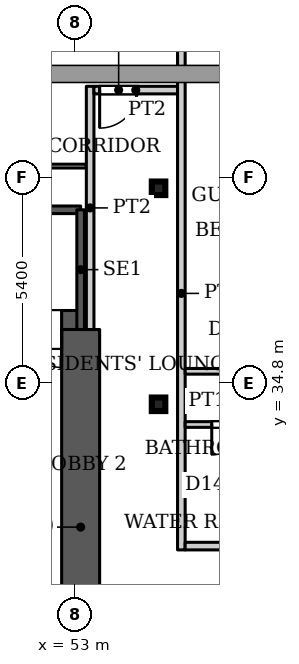
"""IFC4 building model, lengths in metres.
Left out: names, types, materials, properties, quantities, classifications, styles, units other than length and angle.
Written with IfcOpenShell. Run it as: python <this file> out.ifc"""

import sys

from ifc_helpers import new_model, si_unit, direction, frame, frame_2d, origin, origin_2d, place, context, subcontext, project, spatial, rectangle, hollow_rectangle, extrude, source, transform, mapped, element, fill, save


model = new_model("IFC4")
c1 = context("Model", 3, precision=1e-05, world=origin(), true_north=direction((0.0, 1.0)))
c2 = subcontext(c1, "Body", "Model", "MODEL_VIEW")
j1 = project(units=[si_unit("LENGTHUNIT", "METRE"), si_unit("PLANEANGLEUNIT", "RADIAN")], contexts=[c1])
p1 = place(None, origin())
s1 = spatial("IfcSite", under=j1, at=p1, CompositionType="ELEMENT")
p2 = place(p1, origin())
s2 = spatial("IfcBuilding", under=s1, at=p2, CompositionType="ELEMENT")
p3 = place(p2, frame((0.0, 0.0, 69.5)))
s3 = spatial("IfcBuildingStorey", under=s2, at=p3, CompositionType="ELEMENT", Elevation=69.5)
for number, where, z_axis, x_axis in (
    (1, (55.2, 34.232, 0.0), (0.0, 0.0, 1.0), (1.0, 0.0, 0.0)),
    (2, (55.2, 39.916, 0.0), (0.0, 0.0, 1.0), (1.0, 0.0, 0.0)),
):
    element("IfcColumn", number, at=place(p3, frame(where, z_axis=z_axis, x_axis=x_axis)), inside=s3, PredefinedType="COLUMN", context=c2, shape_type="SweptSolid", body=[
        extrude(hollow_rectangle(XDim=0.356, YDim=0.356, WallThickness=0.016, InnerFilletRadius=0.016, OuterFilletRadius=0.032, at=origin_2d()), origin(), (0.0, 0.0, 1.0), 3.9),
    ])
p4 = place(p3, frame((34.75, 36.2, 0.0), z_axis=(0.0, 0.0, 1.0), x_axis=(1.0, 0.0, 0.0)))
e3 = element("IfcWall", 3, at=p4, inside=s3, PredefinedType="SHEAR", context=c2, shape_type="SweptSolid", body=[
    extrude(rectangle(XDim=18.4, YDim=1.0, at=frame_2d((9.2, 0.0))), origin(), (0.0, 0.0, 1.0), 3.9),
])
p5 = place(p4, frame((16.9, 0.0, 0.0)))
e4 = element("IfcOpeningElement", 4, at=p5, cuts=e3, PredefinedType="OPENING", context=c2, shape_type="SweptSolid", body=[
    extrude(rectangle(XDim=1.0, YDim=2.2, at=frame_2d((0.5, 1.1))), frame((0.0, 0.51, 0.0), z_axis=(0.0, -1.0, 0.0), x_axis=(1.0, 0.0, 0.0)), (0.0, 0.0, 1.0), 1.02),
])
p6 = place(p3, frame((53.15, 25.8, 0.0), z_axis=(0.0, 0.0, 1.0), x_axis=(0.0, 1.0, 0.0)))
e5 = element("IfcWall", 5, at=p6, inside=s3, PredefinedType="SHEAR", context=c2, shape_type="SweptSolid", body=[
    extrude(rectangle(XDim=10.4, YDim=1.0, at=frame_2d((5.2, 0.0))), origin(), (0.0, 0.0, 1.0), 3.9),
])
p7 = place(p6, frame((1.175, 0.0, 0.0)))
e6 = element("IfcOpeningElement", 6, at=p7, cuts=e5, PredefinedType="OPENING", context=c2, shape_type="SweptSolid", body=[
    extrude(rectangle(XDim=0.9, YDim=2.2, at=frame_2d((0.45, 1.1))), frame((0.0, 0.51, 0.0), z_axis=(0.0, -1.0, 0.0), x_axis=(1.0, 0.0, 0.0)), (0.0, 0.0, 1.0), 1.02),
])
p8 = place(p3, frame((43.99, 39.35, 0.0), z_axis=(0.0, 0.0, 1.0), x_axis=(1.0, 0.0, 0.0)))
e7 = element("IfcWall", 7, at=p8, inside=s3, PredefinedType="SHEAR", context=c2, shape_type="SweptSolid", body=[
    extrude(rectangle(XDim=9.16, YDim=0.2, at=frame_2d((4.58, 0.0))), origin(), (0.0, 0.0, 1.0), 3.9),
])
p9 = place(p3, frame((53.15, 36.2, 0.0), z_axis=(0.0, 0.0, 1.0), x_axis=(0.0, 1.0, 0.0)))
e8 = element("IfcWall", 8, at=p9, inside=s3, PredefinedType="SHEAR", context=c2, shape_type="SweptSolid", body=[
    extrude(rectangle(XDim=3.15, YDim=0.2, at=frame_2d((1.575, 0.0))), origin(), (0.0, 0.0, 1.0), 3.9),
])
p10 = place(p3, frame((38.499, 40.5, 0.0), z_axis=(0.0, 0.0, 1.0), x_axis=(1.0, 0.0, 0.0)))
e9 = element("IfcWall", 9, at=p10, inside=s3, PredefinedType="PARTITIONING", context=c2, shape_type="SweptSolid", body=[
    extrude(rectangle(XDim=14.801, YDim=0.1, at=frame_2d((7.4, 0.0))), origin(), (0.0, 0.0, 1.0), 3.6),
])
p11 = place(p10, frame((6.701, 0.0, 0.0)))
e10 = element("IfcOpeningElement", 10, at=p11, cuts=e9, PredefinedType="OPENING", context=c2, shape_type="SweptSolid", body=[
    extrude(rectangle(XDim=1.0, YDim=2.1, at=frame_2d((0.5, 1.05))), frame((0.0, 0.06, 0.0), z_axis=(0.0, -1.0, 0.0), x_axis=(1.0, 0.0, 0.0)), (0.0, 0.0, 1.0), 0.12),
])
p12 = place(p3, frame((53.4, 36.199, 0.0), z_axis=(0.0, 0.0, 1.0), x_axis=(0.0, 1.0, 0.0)))
e11 = element("IfcWall", 11, at=p12, inside=s3, PredefinedType="PARTITIONING", context=c2, shape_type="SweptSolid", body=[
    extrude(rectangle(XDim=6.401, YDim=0.2, at=frame_2d((3.201, 0.0))), origin(), (0.0, 0.0, 1.0), 3.6),
])
p13 = place(p3, frame((53.5, 42.5, 0.0), z_axis=(0.0, 0.0, 1.0), x_axis=(1.0, 0.0, 0.0)))
e12 = element("IfcWall", 12, at=p13, inside=s3, PredefinedType="PARTITIONING", context=c2, shape_type="SweptSolid", body=[
    extrude(rectangle(XDim=2.2, YDim=0.2, at=frame_2d((1.1, 0.0))), origin(), (0.0, 0.0, 1.0), 3.6),
])
p14 = place(p13, frame((0.15, 0.0, 0.0)))
e13 = element("IfcOpeningElement", 13, at=p14, cuts=e12, PredefinedType="OPENING", context=c2, shape_type="SweptSolid", body=[
    extrude(rectangle(XDim=1.0, YDim=2.1, at=frame_2d((0.5, 1.05))), frame((0.0, 0.11, 0.0), z_axis=(0.0, -1.0, 0.0), x_axis=(1.0, 0.0, 0.0)), (0.0, 0.0, 1.0), 0.22),
])
p15 = place(p3, frame((55.8, 30.4, 0.0), z_axis=(0.0, 0.0, 1.0), x_axis=(0.0, 1.0, 0.0)))
e14 = element("IfcWall", 14, at=p15, inside=s3, PredefinedType="PARTITIONING", context=c2, shape_type="SweptSolid", body=[
    extrude(rectangle(XDim=13.5, YDim=0.2, at=frame_2d((6.75, 0.0))), origin(), (0.0, 0.0, 1.0), 3.6),
])
p16 = place(p3, frame((55.9, 30.5, 0.0), z_axis=(0.0, 0.0, 1.0), x_axis=(1.0, 0.0, 0.0)))
e15 = element("IfcWall", 15, at=p16, inside=s3, PredefinedType="PARTITIONING", context=c2, shape_type="SweptSolid", body=[
    extrude(rectangle(XDim=42.2, YDim=0.2, at=frame_2d((21.1, 0.0))), origin(), (0.0, 0.0, 1.0), 3.6),
])
p17 = place(p16, frame((14.7, 0.0, 0.0)))
e16 = element("IfcOpeningElement", 16, at=p17, cuts=e15, PredefinedType="OPENING", context=c2, shape_type="SweptSolid", body=[
    extrude(rectangle(XDim=1.0, YDim=2.1, at=frame_2d((0.5, 1.05))), frame((0.0, 0.11, 0.0), z_axis=(0.0, -1.0, 0.0), x_axis=(1.0, 0.0, 0.0)), (0.0, 0.0, 1.0), 0.22),
])
p18 = place(p16, frame((27.9, 0.0, 0.0)))
e17 = element("IfcOpeningElement", 17, at=p18, cuts=e15, PredefinedType="OPENING", context=c2, shape_type="SweptSolid", body=[
    extrude(rectangle(XDim=1.0, YDim=2.1, at=frame_2d((0.5, 1.05))), frame((0.0, 0.11, 0.0), z_axis=(0.0, -1.0, 0.0), x_axis=(1.0, 0.0, 0.0)), (0.0, 0.0, 1.0), 0.22),
])
p19 = place(p16, frame((39.0, 0.0, 0.0)))
e18 = element("IfcOpeningElement", 18, at=p19, cuts=e15, PredefinedType="OPENING", context=c2, shape_type="SweptSolid", body=[
    extrude(rectangle(XDim=1.0, YDim=2.1, at=frame_2d((0.5, 1.05))), frame((0.0, 0.11, 0.0), z_axis=(0.0, -1.0, 0.0), x_axis=(1.0, 0.0, 0.0)), (0.0, 0.0, 1.0), 0.22),
])
p20 = place(p3, frame((55.9, 33.7, 0.0), z_axis=(0.0, 0.0, 1.0), x_axis=(1.0, 0.0, 0.0)))
e19 = element("IfcWall", 19, at=p20, inside=s3, PredefinedType="PARTITIONING", context=c2, shape_type="SweptSolid", body=[
    extrude(rectangle(XDim=14.35, YDim=0.15, at=frame_2d((7.175, 0.0))), origin(), (0.0, 0.0, 1.0), 3.6),
])
p21 = place(p20, frame((0.7, 0.0, 0.0)))
e20 = element("IfcOpeningElement", 20, at=p21, cuts=e19, PredefinedType="OPENING", context=c2, shape_type="SweptSolid", body=[
    extrude(rectangle(XDim=0.8, YDim=2.1, at=frame_2d((0.4, 1.05))), frame((0.0, 0.085, 0.0), z_axis=(0.0, -1.0, 0.0), x_axis=(1.0, 0.0, 0.0)), (0.0, 0.0, 1.0), 0.17),
])
p22 = place(p20, frame((12.3, 0.0, 0.0)))
e21 = element("IfcOpeningElement", 21, at=p22, cuts=e19, PredefinedType="OPENING", context=c2, shape_type="SweptSolid", body=[
    extrude(rectangle(XDim=0.8, YDim=2.1, at=frame_2d((0.4, 1.05))), frame((0.0, 0.085, 0.0), z_axis=(0.0, -1.0, 0.0), x_axis=(1.0, 0.0, 0.0)), (0.0, 0.0, 1.0), 0.17),
])
p23 = place(p20, frame((3.35, 0.0, 0.0)))
e22 = element("IfcOpeningElement", 22, at=p23, cuts=e19, PredefinedType="OPENING", context=c2, shape_type="SweptSolid", body=[
    extrude(rectangle(XDim=0.9, YDim=2.1, at=frame_2d((0.45, 1.05))), frame((0.0, 0.085, 0.0), z_axis=(0.0, -1.0, 0.0), x_axis=(1.0, 0.0, 0.0)), (0.0, 0.0, 1.0), 0.17),
])
p24 = place(p20, frame((10.6, 0.0, 0.0)))
e23 = element("IfcOpeningElement", 23, at=p24, cuts=e19, PredefinedType="OPENING", context=c2, shape_type="SweptSolid", body=[
    extrude(rectangle(XDim=0.8, YDim=2.1, at=frame_2d((0.4, 1.05))), frame((0.0, 0.085, 0.0), z_axis=(0.0, -1.0, 0.0), x_axis=(1.0, 0.0, 0.0)), (0.0, 0.0, 1.0), 0.17),
])
p25 = place(p20, frame((7.3, 0.0, 0.0)))
e24 = element("IfcOpeningElement", 24, at=p25, cuts=e19, PredefinedType="OPENING", context=c2, shape_type="SweptSolid", body=[
    extrude(rectangle(XDim=0.8, YDim=2.1, at=frame_2d((0.4, 1.05))), frame((0.0, 0.085, 0.0), z_axis=(0.0, -1.0, 0.0), x_axis=(1.0, 0.0, 0.0)), (0.0, 0.0, 1.0), 0.17),
])
p26 = place(p20, frame((5.65, 0.0, 0.0)))
e25 = element("IfcOpeningElement", 25, at=p26, cuts=e19, PredefinedType="OPENING", context=c2, shape_type="SweptSolid", body=[
    extrude(rectangle(XDim=0.8, YDim=2.1, at=frame_2d((0.4, 1.05))), frame((0.0, 0.085, 0.0), z_axis=(0.0, -1.0, 0.0), x_axis=(1.0, 0.0, 0.0)), (0.0, 0.0, 1.0), 0.17),
])
p27 = place(p3, frame((55.9, 35.1, 0.0), z_axis=(0.0, 0.0, 1.0), x_axis=(1.0, 0.0, 0.0)))
e26 = element("IfcWall", 26, at=p27, inside=s3, PredefinedType="PARTITIONING", context=c2, shape_type="SweptSolid", body=[
    extrude(rectangle(XDim=18.4, YDim=0.15, at=frame_2d((9.2, 0.0))), origin(), (0.0, 0.0, 1.0), 3.6),
])
p28 = place(p27, frame((1.25, 0.0, 0.0)))
e27 = element("IfcOpeningElement", 27, at=p28, cuts=e26, PredefinedType="OPENING", context=c2, shape_type="SweptSolid", body=[
    extrude(rectangle(XDim=0.9, YDim=2.1, at=frame_2d((0.45, 1.05))), frame((0.0, 0.085, 0.0), z_axis=(0.0, -1.0, 0.0), x_axis=(1.0, 0.0, 0.0)), (0.0, 0.0, 1.0), 0.17),
])
p29 = place(p27, frame((9.2, 0.0, 0.0)))
e28 = element("IfcOpeningElement", 28, at=p29, cuts=e26, PredefinedType="OPENING", context=c2, shape_type="SweptSolid", body=[
    extrude(rectangle(XDim=0.9, YDim=2.1, at=frame_2d((0.45, 1.05))), frame((0.0, 0.085, 0.0), z_axis=(0.0, -1.0, 0.0), x_axis=(1.0, 0.0, 0.0)), (0.0, 0.0, 1.0), 0.17),
])
p30 = place(p27, frame((12.35, 0.0, 0.0)))
e29 = element("IfcOpeningElement", 29, at=p30, cuts=e26, PredefinedType="OPENING", context=c2, shape_type="SweptSolid", body=[
    extrude(rectangle(XDim=1.0, YDim=2.1, at=frame_2d((0.5, 1.05))), frame((0.0, 0.085, 0.0), z_axis=(0.0, -1.0, 0.0), x_axis=(1.0, 0.0, 0.0)), (0.0, 0.0, 1.0), 0.17),
])
p31 = place(p27, frame((15.9, 0.0, 0.0)))
e30 = element("IfcOpeningElement", 30, at=p31, cuts=e26, PredefinedType="OPENING", context=c2, shape_type="SweptSolid", body=[
    extrude(rectangle(XDim=1.6, YDim=2.1, at=frame_2d((0.8, 1.05))), frame((0.0, 0.085, 0.0), z_axis=(0.0, -1.0, 0.0), x_axis=(1.0, 0.0, 0.0)), (0.0, 0.0, 1.0), 0.17),
])
p32 = place(p27, frame((4.4, 0.0, 0.0)))
e31 = element("IfcOpeningElement", 31, at=p32, cuts=e26, PredefinedType="OPENING", context=c2, shape_type="SweptSolid", body=[
    extrude(rectangle(XDim=0.9, YDim=2.1, at=frame_2d((0.45, 1.05))), frame((0.0, 0.085, 0.0), z_axis=(0.0, -1.0, 0.0), x_axis=(1.0, 0.0, 0.0)), (0.0, 0.0, 1.0), 0.17),
])
m1 = source(origin(), c2, "Body", "SweptSolid", [
    extrude(rectangle(XDim=1.0, YDim=2.2, at=frame_2d((0.5, 1.1))), frame((0.0, 0.025, 0.0), z_axis=(0.0, -1.0, 0.0), x_axis=(1.0, 0.0, 0.0)), (0.0, 0.0, 1.0), 0.05),
])
p33 = place(p5, origin())
e32 = element("IfcDoor", 32, at=p33, inside=s3, OperationType="SINGLE_SWING_RIGHT", PredefinedType="DOOR", context=c2, shape_type="MappedRepresentation", body=[
    mapped(m1, transform((0.0, 0.0, 0.0), x_axis=(1.0, 0.0, 0.0), y_axis=(0.0, 1.0, 0.0), z_axis=(0.0, 0.0, 1.0), scale=1.0)),
])
fill(e4, e32)
m2 = source(origin(), c2, "Body", "SweptSolid", [
    extrude(rectangle(XDim=0.8, YDim=2.1, at=frame_2d((0.4, 1.05))), frame((0.0, 0.025, 0.0), z_axis=(0.0, -1.0, 0.0), x_axis=(1.0, 0.0, 0.0)), (0.0, 0.0, 1.0), 0.05),
])
p34 = place(p21, origin())
e33 = element("IfcDoor", 33, at=p34, inside=s3, OperationType="SINGLE_SWING_RIGHT", PredefinedType="DOOR", context=c2, shape_type="MappedRepresentation", body=[
    mapped(m2, transform((0.0, 0.0, 0.0), x_axis=(1.0, 0.0, 0.0), y_axis=(0.0, 1.0, 0.0), z_axis=(0.0, 0.0, 1.0), scale=1.0)),
])
fill(e20, e33)
m3 = source(origin(), c2, "Body", "SweptSolid", [
    extrude(rectangle(XDim=1.0, YDim=2.1, at=frame_2d((0.5, 1.05))), frame((0.0, 0.025, 0.0), z_axis=(0.0, -1.0, 0.0), x_axis=(1.0, 0.0, 0.0)), (0.0, 0.0, 1.0), 0.05),
])
p35 = place(p14, origin())
e34 = element("IfcDoor", 34, at=p35, inside=s3, OperationType="SINGLE_SWING_RIGHT", PredefinedType="DOOR", context=c2, shape_type="MappedRepresentation", body=[
    mapped(m3, transform((0.0, 0.0, 0.0), x_axis=(1.0, 0.0, 0.0), y_axis=(0.0, 1.0, 0.0), z_axis=(0.0, 0.0, 1.0), scale=1.0)),
])
fill(e13, e34)
save(model, sys.argv[1])
